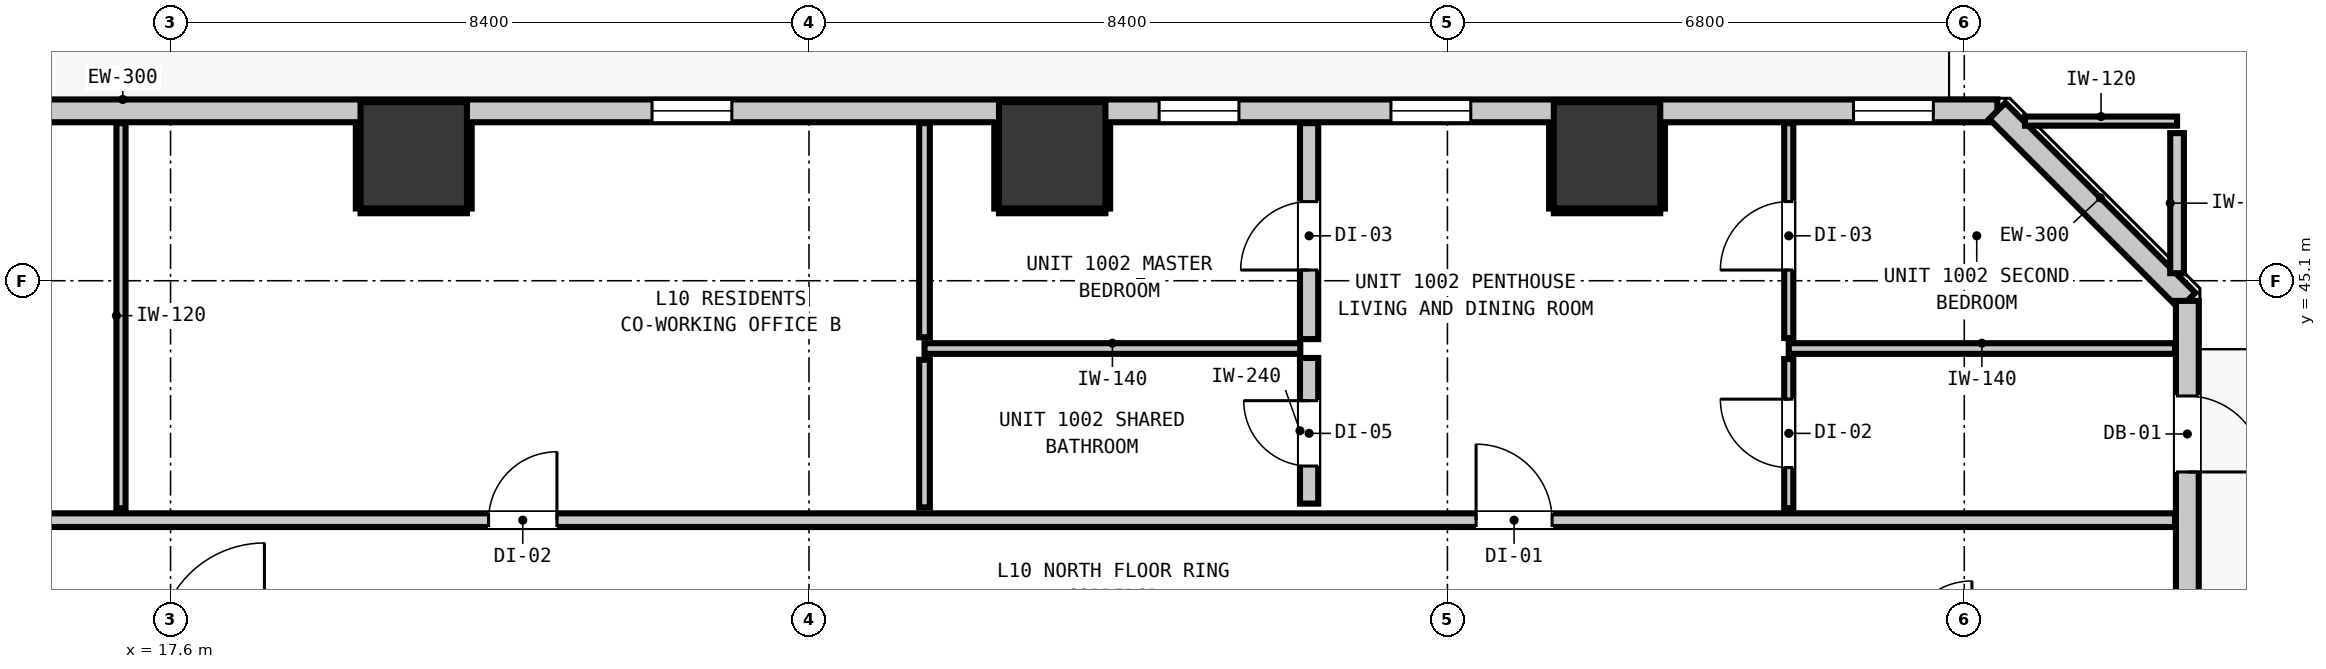
"""IFC4 building model, lengths in metres.
Left out: names, types, materials, properties, quantities, classifications, styles, units other than length and angle.
Written with IfcOpenShell. Run it as: python <this file> out.ifc"""

import sys

from ifc_helpers import new_model, si_unit, direction, frame, frame_2d, origin, origin_2d, place, context, subcontext, project, spatial, rectangle, extrude, element, fill, save


model = new_model("IFC4")
c1 = context("Model", 3, precision=1e-05, world=origin(), true_north=direction((0.0, 1.0)))
c2 = subcontext(c1, "Body", "Model", "MODEL_VIEW")
j1 = project(units=[si_unit("LENGTHUNIT", "METRE"), si_unit("PLANEANGLEUNIT", "RADIAN")], contexts=[c1])
p1 = place(None, origin())
s1 = spatial("IfcSite", under=j1, at=p1, CompositionType="ELEMENT")
p2 = place(p1, origin())
s2 = spatial("IfcBuilding", under=s1, at=p2, CompositionType="ELEMENT")
p3 = place(p2, frame((0.0, 0.0, 38.6)))
s3 = spatial("IfcBuildingStorey", under=s2, at=p3, CompositionType="ELEMENT", Elevation=38.6)
for number, where, z_axis, x_axis in (
    (1, (20.8, 46.75, 0.0), (0.0, 0.0, 1.0), (1.0, 0.0, 0.0)),
    (2, (29.2, 46.75, 0.0), (0.0, 0.0, 1.0), (1.0, 0.0, 0.0)),
    (3, (36.5, 46.75, 0.0), (0.0, 0.0, 1.0), (1.0, 0.0, 0.0)),
):
    element("IfcColumn", number, at=place(p3, frame(where, z_axis=z_axis, x_axis=x_axis)), inside=s3, PredefinedType="COLUMN", context=c2, shape_type="SweptSolid", body=[
        extrude(rectangle(XDim=1.4, YDim=1.4, at=origin_2d()), origin(), (0.0, 0.0, 1.0), 2.9),
    ])
p4 = place(p3, frame((4.165, 47.335, 0.0), z_axis=(0.0, 0.0, 1.0), x_axis=(1.0, 0.0, 0.0)))
e4 = element("IfcWall", 4, at=p4, inside=s3, PredefinedType="STANDARD", context=c2, shape_type="SweptSolid", body=[
    extrude(rectangle(XDim=37.47, YDim=0.3, at=frame_2d((18.735, 0.0))), origin(), (0.0, 0.0, 1.0), 2.9),
])
p5 = place(p4, frame((0.901, 0.0, 0.0)))
e5 = element("IfcOpeningElement", 5, at=p5, cuts=e4, PredefinedType="OPENING", context=c2, shape_type="SweptSolid", body=[
    extrude(rectangle(XDim=1.0, YDim=2.15, at=frame_2d((0.5, 1.075))), frame((0.0, 0.16, 0.0), z_axis=(0.0, -1.0, 0.0), x_axis=(1.0, 0.0, 0.0)), (0.0, 0.0, 1.0), 0.32),
])
p6 = place(p4, frame((4.793, 0.0, 0.85)))
e6 = element("IfcOpeningElement", 6, at=p6, cuts=e4, PredefinedType="OPENING", context=c2, shape_type="SweptSolid", body=[
    extrude(rectangle(XDim=1.05, YDim=1.65, at=frame_2d((0.525, 0.825))), frame((0.0, 0.16, 0.0), z_axis=(0.0, -1.0, 0.0), x_axis=(1.0, 0.0, 0.0)), (0.0, 0.0, 1.0), 0.32),
])
p7 = place(p4, frame((19.77, 0.0, 0.85)))
e7 = element("IfcOpeningElement", 7, at=p7, cuts=e4, PredefinedType="OPENING", context=c2, shape_type="SweptSolid", body=[
    extrude(rectangle(XDim=1.05, YDim=1.65, at=frame_2d((0.525, 0.825))), frame((0.0, 0.16, 0.0), z_axis=(0.0, -1.0, 0.0), x_axis=(1.0, 0.0, 0.0)), (0.0, 0.0, 1.0), 0.32),
])
p8 = place(p4, frame((29.492, 0.0, 0.85)))
e8 = element("IfcOpeningElement", 8, at=p8, cuts=e4, PredefinedType="OPENING", context=c2, shape_type="SweptSolid", body=[
    extrude(rectangle(XDim=1.05, YDim=1.65, at=frame_2d((0.525, 0.825))), frame((0.0, 0.16, 0.0), z_axis=(0.0, -1.0, 0.0), x_axis=(1.0, 0.0, 0.0)), (0.0, 0.0, 1.0), 0.32),
])
p9 = place(p4, frame((26.442, 0.0, 0.85)))
e9 = element("IfcOpeningElement", 9, at=p9, cuts=e4, PredefinedType="OPENING", context=c2, shape_type="SweptSolid", body=[
    extrude(rectangle(XDim=1.05, YDim=1.65, at=frame_2d((0.525, 0.825))), frame((0.0, 0.16, 0.0), z_axis=(0.0, -1.0, 0.0), x_axis=(1.0, 0.0, 0.0)), (0.0, 0.0, 1.0), 0.32),
])
p10 = place(p4, frame((35.578, 0.0, 0.85)))
e10 = element("IfcOpeningElement", 10, at=p10, cuts=e4, PredefinedType="OPENING", context=c2, shape_type="SweptSolid", body=[
    extrude(rectangle(XDim=1.05, YDim=1.65, at=frame_2d((0.525, 0.825))), frame((0.0, 0.16, 0.0), z_axis=(0.0, -1.0, 0.0), x_axis=(1.0, 0.0, 0.0)), (0.0, 0.0, 1.0), 0.32),
])
p11 = place(p3, frame((41.635, 47.335, 0.0), z_axis=(0.0, 0.0, 1.0), x_axis=(0.707106781187, -0.707106781187, 0.0)))
e11 = element("IfcWall", 11, at=p11, inside=s3, PredefinedType="STANDARD", context=c2, shape_type="SweptSolid", body=[
    extrude(rectangle(XDim=3.536, YDim=0.3, at=frame_2d((1.768, 0.0))), origin(), (0.0, 0.0, 1.0), 2.9),
])
p12 = place(p3, frame((44.135, 44.835, 0.0), z_axis=(0.0, 0.0, 1.0), x_axis=(0.0, -1.0, 0.0)))
e12 = element("IfcWall", 12, at=p12, inside=s3, PredefinedType="STANDARD", context=c2, shape_type="SweptSolid", body=[
    extrude(rectangle(XDim=34.67, YDim=0.3, at=frame_2d((17.335, 0.0))), origin(), (0.0, 0.0, 1.0), 2.9),
])
p13 = place(p12, frame((1.251, 0.0, 0.0)))
e13 = element("IfcOpeningElement", 13, at=p13, cuts=e12, PredefinedType="OPENING", context=c2, shape_type="SweptSolid", body=[
    extrude(rectangle(XDim=1.0, YDim=2.15, at=frame_2d((0.5, 1.075))), frame((0.0, 0.16, 0.0), z_axis=(0.0, -1.0, 0.0), x_axis=(1.0, 0.0, 0.0)), (0.0, 0.0, 1.0), 0.32),
])
p14 = place(p12, frame((29.508, 0.0, 0.85)))
e14 = element("IfcOpeningElement", 14, at=p14, cuts=e12, PredefinedType="OPENING", context=c2, shape_type="SweptSolid", body=[
    extrude(rectangle(XDim=1.05, YDim=1.65, at=frame_2d((0.525, 0.825))), frame((0.0, 0.16, 0.0), z_axis=(0.0, -1.0, 0.0), x_axis=(1.0, 0.0, 0.0)), (0.0, 0.0, 1.0), 0.32),
])
p15 = place(p12, frame((19.619, 0.0, 0.85)))
e15 = element("IfcOpeningElement", 15, at=p15, cuts=e12, PredefinedType="OPENING", context=c2, shape_type="SweptSolid", body=[
    extrude(rectangle(XDim=1.05, YDim=1.65, at=frame_2d((0.525, 0.825))), frame((0.0, 0.16, 0.0), z_axis=(0.0, -1.0, 0.0), x_axis=(1.0, 0.0, 0.0)), (0.0, 0.0, 1.0), 0.32),
])
p16 = place(p3, frame((1.827, 41.95, 0.0), z_axis=(0.0, 0.0, 1.0), x_axis=(1.0, 0.0, 0.0)))
e16 = element("IfcWall", 16, at=p16, inside=s3, PredefinedType="PARTITIONING", context=c2, shape_type="SweptSolid", body=[
    extrude(rectangle(XDim=42.146, YDim=0.18, at=frame_2d((21.073, 0.0))), origin(), (0.0, 0.0, 1.0), 2.9),
])
p17 = place(p16, frame((12.322, 0.0, 0.0)))
e17 = element("IfcOpeningElement", 17, at=p17, cuts=e16, PredefinedType="OPENING", context=c2, shape_type="SweptSolid", body=[
    extrude(rectangle(XDim=0.9, YDim=2.1, at=frame_2d((0.45, 1.05))), frame((0.0, 0.1, 0.0), z_axis=(0.0, -1.0, 0.0), x_axis=(1.0, 0.0, 0.0)), (0.0, 0.0, 1.0), 0.2),
])
p18 = place(p16, frame((19.957, 0.0, 0.0)))
e18 = element("IfcOpeningElement", 18, at=p18, cuts=e16, PredefinedType="OPENING", context=c2, shape_type="SweptSolid", body=[
    extrude(rectangle(XDim=0.9, YDim=2.1, at=frame_2d((0.45, 1.05))), frame((0.0, 0.1, 0.0), z_axis=(0.0, -1.0, 0.0), x_axis=(1.0, 0.0, 0.0)), (0.0, 0.0, 1.0), 0.2),
])
p19 = place(p16, frame((32.95, 0.0, 0.0)))
e19 = element("IfcOpeningElement", 19, at=p19, cuts=e16, PredefinedType="OPENING", context=c2, shape_type="SweptSolid", body=[
    extrude(rectangle(XDim=1.0, YDim=2.15, at=frame_2d((0.5, 1.075))), frame((0.0, 0.1, 0.0), z_axis=(0.0, -1.0, 0.0), x_axis=(1.0, 0.0, 0.0)), (0.0, 0.0, 1.0), 0.2),
])
p20 = place(p3, frame((27.52, 44.208, 0.0), z_axis=(0.0, 0.0, 1.0), x_axis=(1.0, 0.0, 0.0)))
e20 = element("IfcWall", 20, at=p20, inside=s3, PredefinedType="PARTITIONING", context=c2, shape_type="SweptSolid", body=[
    extrude(rectangle(XDim=4.944, YDim=0.14, at=frame_2d((2.472, 0.0))), origin(), (0.0, 0.0, 1.0), 2.9),
])
p21 = place(p3, frame((38.891, 44.208, 0.0), z_axis=(0.0, 0.0, 1.0), x_axis=(1.0, 0.0, 0.0)))
e21 = element("IfcWall", 21, at=p21, inside=s3, PredefinedType="PARTITIONING", context=c2, shape_type="SweptSolid", body=[
    extrude(rectangle(XDim=5.082, YDim=0.14, at=frame_2d((2.541, 0.0))), origin(), (0.0, 0.0, 1.0), 2.9),
])
p22 = place(p3, frame((41.999, 47.2, 0.0), z_axis=(0.0, 0.0, 1.0), x_axis=(1.0, 0.0, 0.0)))
e22 = element("IfcWall", 22, at=p22, inside=s3, PredefinedType="PARTITIONING", context=c2, shape_type="SweptSolid", body=[
    extrude(rectangle(XDim=2.001, YDim=0.12, at=frame_2d((1.0, 0.0))), origin(), (0.0, 0.0, 1.0), 2.9),
])
p23 = place(p3, frame((32.58, 42.168, 0.0), z_axis=(0.0, 0.0, 1.0), x_axis=(0.0, 1.0, 0.0)))
e23 = element("IfcWall", 23, at=p23, inside=s3, PredefinedType="PARTITIONING", context=c2, shape_type="SweptSolid", body=[
    extrude(rectangle(XDim=1.916, YDim=0.24, at=frame_2d((0.958, 0.0))), origin(), (0.0, 0.0, 1.0), 2.9),
])
p24 = place(p23, frame((0.494, 0.0, 0.0)))
e24 = element("IfcOpeningElement", 24, at=p24, cuts=e23, PredefinedType="OPENING", context=c2, shape_type="SweptSolid", body=[
    extrude(rectangle(XDim=0.86, YDim=2.02, at=frame_2d((0.43, 1.01))), frame((0.0, 0.13, 0.0), z_axis=(0.0, -1.0, 0.0), x_axis=(1.0, 0.0, 0.0)), (0.0, 0.0, 1.0), 0.26),
])
p25 = place(p3, frame((32.58, 44.332, 0.0), z_axis=(0.0, 0.0, 1.0), x_axis=(0.0, 1.0, 0.0)))
e25 = element("IfcWall", 25, at=p25, inside=s3, PredefinedType="PARTITIONING", context=c2, shape_type="SweptSolid", body=[
    extrude(rectangle(XDim=2.841, YDim=0.24, at=frame_2d((1.42, 0.0))), origin(), (0.0, 0.0, 1.0), 2.9),
])
p26 = place(p25, frame((0.909, 0.0, 0.0)))
e26 = element("IfcOpeningElement", 26, at=p26, cuts=e25, PredefinedType="OPENING", context=c2, shape_type="SweptSolid", body=[
    extrude(rectangle(XDim=0.9, YDim=2.1, at=frame_2d((0.45, 1.05))), frame((0.0, 0.13, 0.0), z_axis=(0.0, -1.0, 0.0), x_axis=(1.0, 0.0, 0.0)), (0.0, 0.0, 1.0), 0.26),
])
p27 = place(p3, frame((44.0, 45.199, 0.0), z_axis=(0.0, 0.0, 1.0), x_axis=(0.0, 1.0, 0.0)))
e27 = element("IfcWall", 27, at=p27, inside=s3, PredefinedType="PARTITIONING", context=c2, shape_type="SweptSolid", body=[
    extrude(rectangle(XDim=1.843, YDim=0.18, at=frame_2d((0.921, 0.0))), origin(), (0.0, 0.0, 1.0), 2.9),
])
p28 = place(p3, frame((27.52, 42.118, 0.0), z_axis=(0.0, 0.0, 1.0), x_axis=(0.0, 1.0, 0.0)))
e28 = element("IfcWall", 28, at=p28, inside=s3, PredefinedType="PARTITIONING", context=c2, shape_type="SweptSolid", body=[
    extrude(rectangle(XDim=1.942, YDim=0.14, at=frame_2d((0.971, 0.0))), origin(), (0.0, 0.0, 1.0), 2.9),
])
p29 = place(p3, frame((27.52, 44.356, 0.0), z_axis=(0.0, 0.0, 1.0), x_axis=(0.0, 1.0, 0.0)))
e29 = element("IfcWall", 29, at=p29, inside=s3, PredefinedType="PARTITIONING", context=c2, shape_type="SweptSolid", body=[
    extrude(rectangle(XDim=2.817, YDim=0.14, at=frame_2d((1.409, 0.0))), origin(), (0.0, 0.0, 1.0), 2.9),
])
p30 = place(p3, frame((16.948, 42.108, 0.0), z_axis=(0.0, 0.0, 1.0), x_axis=(0.0, 1.0, 0.0)))
e30 = element("IfcWall", 30, at=p30, inside=s3, PredefinedType="PARTITIONING", context=c2, shape_type="SweptSolid", body=[
    extrude(rectangle(XDim=5.065, YDim=0.12, at=frame_2d((2.533, 0.0))), origin(), (0.0, 0.0, 1.0), 2.9),
])
p31 = place(p3, frame((38.891, 42.108, 0.0), z_axis=(0.0, 0.0, 1.0), x_axis=(0.0, 1.0, 0.0)))
e31 = element("IfcWall", 31, at=p31, inside=s3, PredefinedType="PARTITIONING", context=c2, shape_type="SweptSolid", body=[
    extrude(rectangle(XDim=1.962, YDim=0.12, at=frame_2d((0.981, 0.0))), origin(), (0.0, 0.0, 1.0), 2.9),
])
p32 = place(p31, frame((0.534, 0.0, 0.0)))
e32 = element("IfcOpeningElement", 32, at=p32, cuts=e31, PredefinedType="OPENING", context=c2, shape_type="SweptSolid", body=[
    extrude(rectangle(XDim=0.9, YDim=2.1, at=frame_2d((0.45, 1.05))), frame((0.0, 0.07, 0.0), z_axis=(0.0, -1.0, 0.0), x_axis=(1.0, 0.0, 0.0)), (0.0, 0.0, 1.0), 0.14),
])
p33 = place(p3, frame((38.891, 44.346, 0.0), z_axis=(0.0, 0.0, 1.0), x_axis=(0.0, 1.0, 0.0)))
e33 = element("IfcWall", 33, at=p33, inside=s3, PredefinedType="PARTITIONING", context=c2, shape_type="SweptSolid", body=[
    extrude(rectangle(XDim=2.827, YDim=0.12, at=frame_2d((1.414, 0.0))), origin(), (0.0, 0.0, 1.0), 2.9),
])
p34 = place(p33, frame((0.895, 0.0, 0.0)))
e34 = element("IfcOpeningElement", 34, at=p34, cuts=e33, PredefinedType="OPENING", context=c2, shape_type="SweptSolid", body=[
    extrude(rectangle(XDim=0.9, YDim=2.1, at=frame_2d((0.45, 1.05))), frame((0.0, 0.07, 0.0), z_axis=(0.0, -1.0, 0.0), x_axis=(1.0, 0.0, 0.0)), (0.0, 0.0, 1.0), 0.14),
])
p35 = place(p3, frame((20.1, 46.018, 0.0), z_axis=(0.0, 0.0, 1.0), x_axis=(1.0, 0.0, 0.0)))
e35 = element("IfcWall", 35, at=p35, inside=s3, PredefinedType="PARTITIONING", context=c2, shape_type="SweptSolid", body=[
    extrude(rectangle(XDim=1.4, YDim=0.06, at=frame_2d((0.7, 0.0))), origin(), (0.0, 0.0, 1.0), 1.45),
])
for number, where, z_axis, x_axis in (
    (36, (20.068, 46.05, 0.0), (0.0, 0.0, 1.0), (0.0, 1.0, 0.0)),
    (37, (21.532, 46.05, 0.0), (0.0, 0.0, 1.0), (0.0, 1.0, 0.0)),
):
    element("IfcWall", number, at=place(p3, frame(where, z_axis=z_axis, x_axis=x_axis)), inside=s3, PredefinedType="PARTITIONING", context=c2, shape_type="SweptSolid", body=[
        extrude(rectangle(XDim=1.12, YDim=0.06, at=frame_2d((0.56, 0.0))), origin(), (0.0, 0.0, 1.0), 1.45),
    ])
p36 = place(p3, frame((28.5, 46.018, 0.0), z_axis=(0.0, 0.0, 1.0), x_axis=(1.0, 0.0, 0.0)))
e38 = element("IfcWall", 38, at=p36, inside=s3, PredefinedType="PARTITIONING", context=c2, shape_type="SweptSolid", body=[
    extrude(rectangle(XDim=1.4, YDim=0.06, at=frame_2d((0.7, 0.0))), origin(), (0.0, 0.0, 1.0), 1.45),
])
for number, where, z_axis, x_axis in (
    (39, (28.468, 46.05, 0.0), (0.0, 0.0, 1.0), (0.0, 1.0, 0.0)),
    (40, (29.932, 46.05, 0.0), (0.0, 0.0, 1.0), (0.0, 1.0, 0.0)),
):
    element("IfcWall", number, at=place(p3, frame(where, z_axis=z_axis, x_axis=x_axis)), inside=s3, PredefinedType="PARTITIONING", context=c2, shape_type="SweptSolid", body=[
        extrude(rectangle(XDim=1.12, YDim=0.06, at=frame_2d((0.56, 0.0))), origin(), (0.0, 0.0, 1.0), 1.45),
    ])
p37 = place(p3, frame((35.8, 46.018, 0.0), z_axis=(0.0, 0.0, 1.0), x_axis=(1.0, 0.0, 0.0)))
e41 = element("IfcWall", 41, at=p37, inside=s3, PredefinedType="PARTITIONING", context=c2, shape_type="SweptSolid", body=[
    extrude(rectangle(XDim=1.4, YDim=0.06, at=frame_2d((0.7, 0.0))), origin(), (0.0, 0.0, 1.0), 1.45),
])
for number, where, z_axis, x_axis in (
    (42, (35.768, 46.05, 0.0), (0.0, 0.0, 1.0), (0.0, 1.0, 0.0)),
    (43, (37.232, 46.05, 0.0), (0.0, 0.0, 1.0), (0.0, 1.0, 0.0)),
):
    element("IfcWall", number, at=place(p3, frame(where, z_axis=z_axis, x_axis=x_axis)), inside=s3, PredefinedType="PARTITIONING", context=c2, shape_type="SweptSolid", body=[
        extrude(rectangle(XDim=1.12, YDim=0.06, at=frame_2d((0.56, 0.0))), origin(), (0.0, 0.0, 1.0), 1.45),
    ])
p38 = place(p13, origin())
e44 = element("IfcDoor", 44, at=p38, inside=s3, OperationType="SINGLE_SWING_RIGHT", PredefinedType="DOOR", context=c2, shape_type="SweptSolid", body=[
    extrude(rectangle(XDim=1.0, YDim=2.15, at=frame_2d((0.5, 1.075))), frame((0.0, 0.025, 0.0), z_axis=(0.0, -1.0, 0.0), x_axis=(1.0, 0.0, 0.0)), (0.0, 0.0, 1.0), 0.05),
])
fill(e13, e44)
p39 = place(p7, origin())
e45 = element("IfcWindow", 45, at=p39, inside=s3, PartitioningType="SINGLE_PANEL", PredefinedType="WINDOW", context=c2, shape_type="SweptSolid", body=[
    extrude(rectangle(XDim=1.05, YDim=1.65, at=frame_2d((0.525, 0.825))), frame((0.0, 0.03, 0.0), z_axis=(0.0, -1.0, 0.0), x_axis=(1.0, 0.0, 0.0)), (0.0, 0.0, 1.0), 0.06),
])
fill(e7, e45)
p40 = place(p8, origin())
e46 = element("IfcWindow", 46, at=p40, inside=s3, PartitioningType="SINGLE_PANEL", PredefinedType="WINDOW", context=c2, shape_type="SweptSolid", body=[
    extrude(rectangle(XDim=1.05, YDim=1.65, at=frame_2d((0.525, 0.825))), frame((0.0, 0.03, 0.0), z_axis=(0.0, -1.0, 0.0), x_axis=(1.0, 0.0, 0.0)), (0.0, 0.0, 1.0), 0.06),
])
fill(e8, e46)
p41 = place(p9, origin())
e47 = element("IfcWindow", 47, at=p41, inside=s3, PartitioningType="SINGLE_PANEL", PredefinedType="WINDOW", context=c2, shape_type="SweptSolid", body=[
    extrude(rectangle(XDim=1.05, YDim=1.65, at=frame_2d((0.525, 0.825))), frame((0.0, 0.03, 0.0), z_axis=(0.0, -1.0, 0.0), x_axis=(1.0, 0.0, 0.0)), (0.0, 0.0, 1.0), 0.06),
])
fill(e9, e47)
p42 = place(p10, origin())
e48 = element("IfcWindow", 48, at=p42, inside=s3, PartitioningType="SINGLE_PANEL", PredefinedType="WINDOW", context=c2, shape_type="SweptSolid", body=[
    extrude(rectangle(XDim=1.05, YDim=1.65, at=frame_2d((0.525, 0.825))), frame((0.0, 0.03, 0.0), z_axis=(0.0, -1.0, 0.0), x_axis=(1.0, 0.0, 0.0)), (0.0, 0.0, 1.0), 0.06),
])
fill(e10, e48)
p43 = place(p18, origin())
e49 = element("IfcDoor", 49, at=p43, inside=s3, OperationType="SINGLE_SWING_RIGHT", PredefinedType="DOOR", context=c2, shape_type="SweptSolid", body=[
    extrude(rectangle(XDim=0.9, YDim=2.1, at=frame_2d((0.45, 1.05))), frame((0.0, 0.025, 0.0), z_axis=(0.0, -1.0, 0.0), x_axis=(1.0, 0.0, 0.0)), (0.0, 0.0, 1.0), 0.05),
])
fill(e18, e49)
p44 = place(p19, origin())
e50 = element("IfcDoor", 50, at=p44, inside=s3, OperationType="SINGLE_SWING_LEFT", PredefinedType="DOOR", context=c2, shape_type="SweptSolid", body=[
    extrude(rectangle(XDim=1.0, YDim=2.15, at=frame_2d((0.5, 1.075))), frame((0.0, 0.025, 0.0), z_axis=(0.0, -1.0, 0.0), x_axis=(1.0, 0.0, 0.0)), (0.0, 0.0, 1.0), 0.05),
])
fill(e19, e50)
p45 = place(p24, origin())
e51 = element("IfcDoor", 51, at=p45, inside=s3, OperationType="SINGLE_SWING_RIGHT", PredefinedType="DOOR", context=c2, shape_type="SweptSolid", body=[
    extrude(rectangle(XDim=0.86, YDim=2.02, at=frame_2d((0.43, 1.01))), frame((0.0, 0.025, 0.0), z_axis=(0.0, -1.0, 0.0), x_axis=(1.0, 0.0, 0.0)), (0.0, 0.0, 1.0), 0.05),
])
fill(e24, e51)
p46 = place(p26, origin())
e52 = element("IfcDoor", 52, at=p46, inside=s3, OperationType="SINGLE_SWING_LEFT", PredefinedType="DOOR", context=c2, shape_type="SweptSolid", body=[
    extrude(rectangle(XDim=0.9, YDim=2.1, at=frame_2d((0.45, 1.05))), frame((0.0, 0.025, 0.0), z_axis=(0.0, -1.0, 0.0), x_axis=(1.0, 0.0, 0.0)), (0.0, 0.0, 1.0), 0.05),
])
fill(e26, e52)
p47 = place(p32, origin())
e53 = element("IfcDoor", 53, at=p47, inside=s3, OperationType="SINGLE_SWING_RIGHT", PredefinedType="DOOR", context=c2, shape_type="SweptSolid", body=[
    extrude(rectangle(XDim=0.9, YDim=2.1, at=frame_2d((0.45, 1.05))), frame((0.0, 0.025, 0.0), z_axis=(0.0, -1.0, 0.0), x_axis=(1.0, 0.0, 0.0)), (0.0, 0.0, 1.0), 0.05),
])
fill(e32, e53)
p48 = place(p34, origin())
e54 = element("IfcDoor", 54, at=p48, inside=s3, OperationType="SINGLE_SWING_LEFT", PredefinedType="DOOR", context=c2, shape_type="SweptSolid", body=[
    extrude(rectangle(XDim=0.9, YDim=2.1, at=frame_2d((0.45, 1.05))), frame((0.0, 0.025, 0.0), z_axis=(0.0, -1.0, 0.0), x_axis=(1.0, 0.0, 0.0)), (0.0, 0.0, 1.0), 0.05),
])
fill(e34, e54)
save(model, sys.argv[1])
